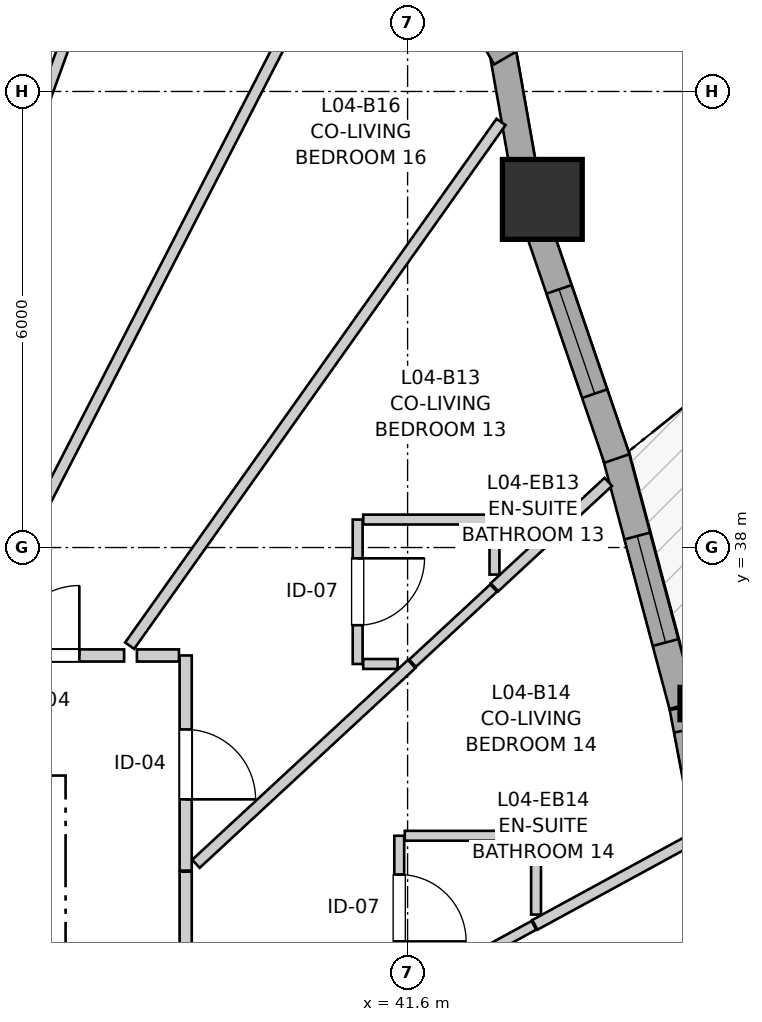
"""IFC4 building model, lengths in metres.
Left out: names, types, materials, properties, quantities, classifications, styles, units other than length and angle.
Written with IfcOpenShell. Run it as: python <this file> out.ifc"""

import sys

from ifc_helpers import new_model, si_unit, direction, frame, frame_2d, origin, origin_2d, place, context, subcontext, project, spatial, rectangle, i_section, extrude, source, transform, mapped, element, fill, save


model = new_model("IFC4")
c1 = context("Model", 3, precision=1e-05, world=origin(), true_north=direction((0.0, 1.0)))
c2 = subcontext(c1, "Body", "Model", "MODEL_VIEW")
j1 = project(units=[si_unit("LENGTHUNIT", "METRE"), si_unit("PLANEANGLEUNIT", "RADIAN")], contexts=[c1])
p1 = place(None, origin())
s1 = spatial("IfcSite", under=j1, at=p1, CompositionType="ELEMENT")
p2 = place(p1, origin())
s2 = spatial("IfcBuilding", under=s1, at=p2, CompositionType="ELEMENT")
p3 = place(p2, frame((0.0, 0.0, 17.4)))
s3 = spatial("IfcBuildingStorey", under=s2, at=p3, CompositionType="ELEMENT", Elevation=17.4)
m1 = source(origin(), c2, "Body", "SweptSolid", [
    extrude(i_section(OverallWidth=0.409, OverallDepth=0.425, WebThickness=0.03, FlangeThickness=0.048, FilletRadius=0.015, at=origin_2d()), origin(), (0.0, 0.0, 1.0), 2.94),
])
p4 = place(p3, frame((45.389, 35.948, 0.0), z_axis=(0.0, 0.0, 1.0), x_axis=(1.0, 0.0, 0.0)))
e1 = element("IfcColumn", 1, at=p4, inside=s3, PredefinedType="PILASTER", context=c2, shape_type="MappedRepresentation", body=[
    mapped(m1, transform((0.0, 0.0, 0.0), x_axis=(1.0, 0.0, 0.0), y_axis=(0.0, 1.0, 0.0), z_axis=(0.0, 0.0, 1.0), scale=1.0)),
])
m2 = source(origin(), c2, "Body", "SweptSolid", [
    extrude(rectangle(XDim=1.05, YDim=1.05, at=origin_2d()), origin(), (0.0, 0.0, 1.0), 2.94),
])
p5 = place(p3, frame((43.373, 42.58, 0.0), z_axis=(0.0, 0.0, 1.0), x_axis=(1.0, 0.0, 0.0)))
e2 = element("IfcColumn", 2, at=p5, inside=s3, PredefinedType="COLUMN", context=c2, shape_type="MappedRepresentation", body=[
    mapped(m2, transform((0.0, 0.0, 0.0), x_axis=(1.0, 0.0, 0.0), y_axis=(0.0, 1.0, 0.0), z_axis=(0.0, 0.0, 1.0), scale=1.0)),
])
p6 = place(p3, frame((45.854, 32.562, 0.0), z_axis=(0.0, 0.0, 1.0), x_axis=(-0.186698837055, 0.982417194598, 0.0)))
e3 = element("IfcWall", 3, at=p6, inside=s3, PredefinedType="SOLIDWALL", context=c2, shape_type="SweptSolid", body=[
    extrude(rectangle(XDim=3.393, YDim=0.35, at=frame_2d((1.697, 0.0))), origin(), (0.0, 0.0, 1.0), 2.42),
])
p7 = place(p6, frame((0.305, 0.0, 0.82)))
e4 = element("IfcOpeningElement", 4, at=p7, cuts=e3, PredefinedType="OPENING", context=c2, shape_type="SweptSolid", body=[
    extrude(rectangle(XDim=1.15, YDim=1.2, at=frame_2d((0.575, 0.6))), frame((0.0, 0.185, 0.0), z_axis=(0.0, -1.0, 0.0), x_axis=(1.0, 0.0, 0.0)), (0.0, 0.0, 1.0), 0.37),
])
p8 = place(p6, frame((1.842, 0.0, 0.82)))
e5 = element("IfcOpeningElement", 5, at=p8, cuts=e3, PredefinedType="OPENING", context=c2, shape_type="SweptSolid", body=[
    extrude(rectangle(XDim=1.25, YDim=1.35, at=frame_2d((0.625, 0.675))), frame((0.0, 0.185, 0.0), z_axis=(0.0, -1.0, 0.0), x_axis=(1.0, 0.0, 0.0)), (0.0, 0.0, 1.0), 0.37),
])
p9 = place(p3, frame((45.214, 35.922, 0.0), z_axis=(0.0, 0.0, 1.0), x_axis=(-0.257081073508, 0.966389839373, 0.0)))
e6 = element("IfcWall", 6, at=p9, inside=s3, PredefinedType="SOLIDWALL", context=c2, shape_type="SweptSolid", body=[
    extrude(rectangle(XDim=3.449, YDim=0.35, at=frame_2d((1.725, 0.0))), origin(), (0.0, 0.0, 1.0), 2.42),
])
p10 = place(p9, frame((0.857, 0.0, 0.82)))
e7 = element("IfcOpeningElement", 7, at=p10, cuts=e6, PredefinedType="OPENING", context=c2, shape_type="SweptSolid", body=[
    extrude(rectangle(XDim=1.45, YDim=1.25, at=frame_2d((0.725, 0.625))), frame((0.0, 0.185, 0.0), z_axis=(0.0, -1.0, 0.0), x_axis=(1.0, 0.0, 0.0)), (0.0, 0.0, 1.0), 0.37),
])
p11 = place(p3, frame((44.353, 39.171, 0.0), z_axis=(0.0, 0.0, 1.0), x_axis=(-0.323604310653, 0.946192501623, 0.0)))
e8 = element("IfcWall", 8, at=p11, inside=s3, PredefinedType="SOLIDWALL", context=c2, shape_type="SweptSolid", body=[
    extrude(rectangle(XDim=3.243, YDim=0.35, at=frame_2d((1.621, 0.0))), origin(), (0.0, 0.0, 1.0), 2.42),
])
p12 = place(p11, frame((0.901, 0.0, 0.82)))
e9 = element("IfcOpeningElement", 9, at=p12, cuts=e8, PredefinedType="OPENING", context=c2, shape_type="SweptSolid", body=[
    extrude(rectangle(XDim=1.45, YDim=1.25, at=frame_2d((0.725, 0.625))), frame((0.0, 0.185, 0.0), z_axis=(0.0, -1.0, 0.0), x_axis=(1.0, 0.0, 0.0)), (0.0, 0.0, 1.0), 0.37),
])
p13 = place(p3, frame((43.148, 42.845, 0.0), z_axis=(0.0, 0.0, 1.0), x_axis=(-0.173745591742, 0.984790571315, 0.0)))
e10 = element("IfcWall", 10, at=p13, inside=s3, PredefinedType="SOLIDWALL", context=c2, shape_type="SweptSolid", body=[
    extrude(rectangle(XDim=1.752, YDim=0.35, at=frame_2d((0.876, 0.0))), origin(), (0.0, 0.0, 1.0), 2.42),
])
p14 = place(p3, frame((42.89, 44.443, 0.0), z_axis=(0.0, 0.0, 1.0), x_axis=(-0.499995423472, 0.866028046028, 0.0)))
e11 = element("IfcWall", 11, at=p14, inside=s3, PredefinedType="SOLIDWALL", context=c2, shape_type="SweptSolid", body=[
    extrude(rectangle(XDim=2.09, YDim=0.35, at=frame_2d((1.045, 0.0))), origin(), (0.0, 0.0, 1.0), 2.42),
])
p15 = place(p14, frame((0.32, 0.0, 0.82)))
e12 = element("IfcOpeningElement", 12, at=p15, cuts=e11, PredefinedType="OPENING", context=c2, shape_type="SweptSolid", body=[
    extrude(rectangle(XDim=1.45, YDim=1.25, at=frame_2d((0.725, 0.625))), frame((0.0, 0.185, 0.0), z_axis=(0.0, -1.0, 0.0), x_axis=(1.0, 0.0, 0.0)), (0.0, 0.0, 1.0), 0.37),
])
p16 = place(p3, frame((38.68, 33.735, 0.0), z_axis=(0.0, 0.0, 1.0), x_axis=(0.0, -1.0, 0.0)))
e13 = element("IfcWall", 13, at=p16, inside=s3, PredefinedType="PARTITIONING", context=c2, shape_type="SweptSolid", body=[
    extrude(rectangle(XDim=3.217, YDim=0.16, at=frame_2d((1.608, 0.0))), origin(), (0.0, 0.0, 1.0), 2.94),
])
p17 = place(p16, frame((1.15, 0.0, 0.0)))
e14 = element("IfcOpeningElement", 14, at=p17, cuts=e13, PredefinedType="OPENING", context=c2, shape_type="SweptSolid", body=[
    extrude(rectangle(XDim=0.92, YDim=2.1, at=frame_2d((0.46, 1.05))), frame((0.0, 0.09, 0.0), z_axis=(0.0, -1.0, 0.0), x_axis=(1.0, 0.0, 0.0)), (0.0, 0.0, 1.0), 0.18),
])
p18 = place(p3, frame((38.68, 36.58, 0.0), z_axis=(0.0, 0.0, 1.0), x_axis=(0.0, -1.0, 0.0)))
e15 = element("IfcWall", 15, at=p18, inside=s3, PredefinedType="PARTITIONING", context=c2, shape_type="SweptSolid", body=[
    extrude(rectangle(XDim=2.83, YDim=0.16, at=frame_2d((1.415, 0.0))), origin(), (0.0, 0.0, 1.0), 2.94),
])
p19 = place(p18, frame((0.973, 0.0, 0.0)))
e16 = element("IfcOpeningElement", 16, at=p19, cuts=e15, PredefinedType="OPENING", context=c2, shape_type="SweptSolid", body=[
    extrude(rectangle(XDim=0.92, YDim=2.1, at=frame_2d((0.46, 1.05))), frame((0.0, 0.09, 0.0), z_axis=(0.0, -1.0, 0.0), x_axis=(1.0, 0.0, 0.0)), (0.0, 0.0, 1.0), 0.18),
])
p20 = place(p3, frame((35.773, 36.58, 0.0), z_axis=(0.0, 0.0, 1.0), x_axis=(1.0, 0.0, 0.0)))
e17 = element("IfcWall", 17, at=p20, inside=s3, PredefinedType="PARTITIONING", context=c2, shape_type="SweptSolid", body=[
    extrude(rectangle(XDim=2.097, YDim=0.16, at=frame_2d((1.049, 0.0))), origin(), (0.0, 0.0, 1.0), 2.94),
])
p21 = place(p20, frame((0.588, 0.0, 0.0)))
e18 = element("IfcOpeningElement", 18, at=p21, cuts=e17, PredefinedType="OPENING", context=c2, shape_type="SweptSolid", body=[
    extrude(rectangle(XDim=0.92, YDim=2.1, at=frame_2d((0.46, 1.05))), frame((0.0, 0.09, 0.0), z_axis=(0.0, -1.0, 0.0), x_axis=(1.0, 0.0, 0.0)), (0.0, 0.0, 1.0), 0.18),
])
p22 = place(p3, frame((40.943, 38.368, 0.0), z_axis=(0.0, 0.0, 1.0), x_axis=(0.0, -1.0, 0.0)))
e19 = element("IfcWall", 19, at=p22, inside=s3, PredefinedType="PARTITIONING", context=c2, shape_type="SweptSolid", body=[
    extrude(rectangle(XDim=1.9, YDim=0.13, at=frame_2d((0.95, 0.0))), origin(), (0.0, 0.0, 1.0), 2.94),
])
p23 = place(p22, frame((0.51, 0.0, 0.0)))
e20 = element("IfcOpeningElement", 20, at=p23, cuts=e19, PredefinedType="OPENING", context=c2, shape_type="SweptSolid", body=[
    extrude(rectangle(XDim=0.88, YDim=2.05, at=frame_2d((0.44, 1.025))), frame((0.0, 0.075, 0.0), z_axis=(0.0, -1.0, 0.0), x_axis=(1.0, 0.0, 0.0)), (0.0, 0.0, 1.0), 0.15),
])
p24 = place(p3, frame((41.49, 34.208, 0.0), z_axis=(0.0, 0.0, 1.0), x_axis=(0.0, -1.0, 0.0)))
e21 = element("IfcWall", 21, at=p24, inside=s3, PredefinedType="PARTITIONING", context=c2, shape_type="SweptSolid", body=[
    extrude(rectangle(XDim=1.9, YDim=0.13, at=frame_2d((0.95, 0.0))), origin(), (0.0, 0.0, 1.0), 2.94),
])
p25 = place(p24, frame((0.51, 0.0, 0.0)))
e22 = element("IfcOpeningElement", 22, at=p25, cuts=e21, PredefinedType="OPENING", context=c2, shape_type="SweptSolid", body=[
    extrude(rectangle(XDim=0.88, YDim=2.05, at=frame_2d((0.44, 1.025))), frame((0.0, 0.075, 0.0), z_axis=(0.0, -1.0, 0.0), x_axis=(1.0, 0.0, 0.0)), (0.0, 0.0, 1.0), 0.15),
])
p26 = place(p3, frame((34.219, 36.692, 0.0), z_axis=(0.0, 0.0, 1.0), x_axis=(0.340186046968, 0.940358151689, 0.0)))
e23 = element("IfcWall", 23, at=p26, inside=s3, PredefinedType="PARTITIONING", context=c2, shape_type="SweptSolid", body=[
    extrude(rectangle(XDim=11.951, YDim=0.145, at=frame_2d((5.976, 0.0))), origin(), (0.0, 0.0, 1.0), 2.94),
])
p27 = place(p3, frame((35.852, 36.7, 0.0), z_axis=(0.0, 0.0, 1.0), x_axis=(0.457258091214, 0.889334041865, 0.0)))
e24 = element("IfcWall", 24, at=p27, inside=s3, PredefinedType="PARTITIONING", context=c2, shape_type="SweptSolid", body=[
    extrude(rectangle(XDim=11.227, YDim=0.145, at=frame_2d((5.613, 0.0))), origin(), (0.0, 0.0, 1.0), 2.94),
])
p28 = place(p3, frame((37.943, 36.708, 0.0), z_axis=(0.0, 0.0, 1.0), x_axis=(0.578429476704, 0.81573239514, 0.0)))
e25 = element("IfcWall", 25, at=p28, inside=s3, PredefinedType="PARTITIONING", context=c2, shape_type="SweptSolid", body=[
    extrude(rectangle(XDim=8.447, YDim=0.145, at=frame_2d((4.223, 0.0))), origin(), (0.0, 0.0, 1.0), 2.94),
])
p29 = place(p3, frame((38.815, 33.839, 0.0), z_axis=(0.0, 0.0, 1.0), x_axis=(0.733718730688, 0.67945332749, 0.0)))
e26 = element("IfcWall", 26, at=p29, inside=s3, PredefinedType="PARTITIONING", context=c2, shape_type="SweptSolid", body=[
    extrude(rectangle(XDim=3.869, YDim=0.145, at=frame_2d((1.935, 0.0))), origin(), (0.0, 0.0, 1.0), 2.94),
])
p30 = place(p3, frame((43.275, 33.036, 0.0), z_axis=(0.0, 0.0, 1.0), x_axis=(0.878237509553, 0.478224713721, 0.0)))
e27 = element("IfcWall", 27, at=p30, inside=s3, PredefinedType="PARTITIONING", context=c2, shape_type="SweptSolid", body=[
    extrude(rectangle(XDim=2.372, YDim=0.145, at=frame_2d((1.186, 0.0))), origin(), (0.0, 0.0, 1.0), 2.94),
])
p31 = place(p3, frame((42.743, 37.477, 0.0), z_axis=(0.0, 0.0, 1.0), x_axis=(0.73374741774, 0.679422347999, 0.0)))
e28 = element("IfcWall", 28, at=p31, inside=s3, PredefinedType="PARTITIONING", context=c2, shape_type="SweptSolid", body=[
    extrude(rectangle(XDim=2.04, YDim=0.145, at=frame_2d((1.02, 0.0))), origin(), (0.0, 0.0, 1.0), 2.94),
])
p32 = place(p3, frame((41.016, 38.368, 0.0), z_axis=(0.0, 0.0, 1.0), x_axis=(1.0, 0.0, 0.0)))
e29 = element("IfcWall", 29, at=p32, inside=s3, PredefinedType="PARTITIONING", context=c2, shape_type="SweptSolid", body=[
    extrude(rectangle(XDim=1.727, YDim=0.13, at=frame_2d((0.863, 0.0))), origin(), (0.0, 0.0, 1.0), 2.94),
])
p33 = place(p3, frame((41.563, 34.208, 0.0), z_axis=(0.0, 0.0, 1.0), x_axis=(1.0, 0.0, 0.0)))
e30 = element("IfcWall", 30, at=p33, inside=s3, PredefinedType="PARTITIONING", context=c2, shape_type="SweptSolid", body=[
    extrude(rectangle(XDim=1.727, YDim=0.13, at=frame_2d((0.864, 0.0))), origin(), (0.0, 0.0, 1.0), 2.94),
])
p34 = place(p3, frame((41.978, 32.33, 0.0), z_axis=(0.0, 0.0, 1.0), x_axis=(0.878138043068, 0.478407334097, 0.0)))
e31 = element("IfcWall", 31, at=p34, inside=s3, PredefinedType="PARTITIONING", context=c2, shape_type="SweptSolid", body=[
    extrude(rectangle(XDim=1.462, YDim=0.13, at=frame_2d((0.731, 0.0))), origin(), (0.0, 0.0, 1.0), 2.94),
])
p35 = place(p3, frame((41.665, 36.478, 0.0), z_axis=(0.0, 0.0, 1.0), x_axis=(0.733534386117, 0.679652340821, 0.0)))
e32 = element("IfcWall", 32, at=p35, inside=s3, PredefinedType="PARTITIONING", context=c2, shape_type="SweptSolid", body=[
    extrude(rectangle(XDim=1.454, YDim=0.13, at=frame_2d((0.727, 0.0))), origin(), (0.0, 0.0, 1.0), 2.94),
])
p36 = place(p3, frame((43.29, 33.171, 0.0), z_axis=(0.0, 0.0, 1.0), x_axis=(0.0, 1.0, 0.0)))
e33 = element("IfcWall", 33, at=p36, inside=s3, PredefinedType="PARTITIONING", context=c2, shape_type="SweptSolid", body=[
    extrude(rectangle(XDim=0.964, YDim=0.13, at=frame_2d((0.482, 0.0))), origin(), (0.0, 0.0, 1.0), 2.94),
])
p37 = place(p3, frame((42.743, 37.644, 0.0), z_axis=(0.0, 0.0, 1.0), x_axis=(0.0, 1.0, 0.0)))
e34 = element("IfcWall", 34, at=p37, inside=s3, PredefinedType="PARTITIONING", context=c2, shape_type="SweptSolid", body=[
    extrude(rectangle(XDim=0.651, YDim=0.13, at=frame_2d((0.325, 0.0))), origin(), (0.0, 0.0, 1.0), 2.94),
])
p38 = place(p3, frame((38.039, 36.58, 0.0), z_axis=(0.0, 0.0, 1.0), x_axis=(1.0, 0.0, 0.0)))
e35 = element("IfcWall", 35, at=p38, inside=s3, PredefinedType="PARTITIONING", context=c2, shape_type="SweptSolid", body=[
    extrude(rectangle(XDim=0.553, YDim=0.16, at=frame_2d((0.277, 0.0))), origin(), (0.0, 0.0, 1.0), 2.94),
])
p39 = place(p3, frame((41.016, 36.468, 0.0), z_axis=(0.0, 0.0, 1.0), x_axis=(1.0, 0.0, 0.0)))
e36 = element("IfcWall", 36, at=p39, inside=s3, PredefinedType="PARTITIONING", context=c2, shape_type="SweptSolid", body=[
    extrude(rectangle(XDim=0.453, YDim=0.13, at=frame_2d((0.227, 0.0))), origin(), (0.0, 0.0, 1.0), 2.94),
])
m3 = source(origin(), c2, "Body", "SweptSolid", [
    extrude(rectangle(XDim=1.45, YDim=1.25, at=frame_2d((0.725, 0.625))), frame((0.0, 0.03, 0.0), z_axis=(0.0, -1.0, 0.0), x_axis=(1.0, 0.0, 0.0)), (0.0, 0.0, 1.0), 0.06),
])
p40 = place(p10, origin())
e37 = element("IfcWindow", 37, at=p40, inside=s3, PartitioningType="SINGLE_PANEL", PredefinedType="WINDOW", context=c2, shape_type="MappedRepresentation", body=[
    mapped(m3, transform((0.0, 0.0, 0.0), x_axis=(1.0, 0.0, 0.0), y_axis=(0.0, 1.0, 0.0), z_axis=(0.0, 0.0, 1.0), scale=1.0)),
])
fill(e7, e37)
p41 = place(p12, origin())
e38 = element("IfcWindow", 38, at=p41, inside=s3, PartitioningType="SINGLE_PANEL", PredefinedType="WINDOW", context=c2, shape_type="MappedRepresentation", body=[
    mapped(m3, transform((0.0, 0.0, 0.0), x_axis=(1.0, 0.0, 0.0), y_axis=(0.0, 1.0, 0.0), z_axis=(0.0, 0.0, 1.0), scale=1.0)),
])
fill(e9, e38)
m4 = source(origin(), c2, "Body", "SweptSolid", [
    extrude(rectangle(XDim=0.92, YDim=2.1, at=frame_2d((0.46, 1.05))), frame((0.0, 0.025, 0.0), z_axis=(0.0, -1.0, 0.0), x_axis=(1.0, 0.0, 0.0)), (0.0, 0.0, 1.0), 0.05),
])
p42 = place(p19, origin())
e39 = element("IfcDoor", 39, at=p42, inside=s3, OperationType="SINGLE_SWING_RIGHT", PredefinedType="DOOR", context=c2, shape_type="MappedRepresentation", body=[
    mapped(m4, transform((0.0, 0.0, 0.0), x_axis=(1.0, 0.0, 0.0), y_axis=(0.0, 1.0, 0.0), z_axis=(0.0, 0.0, 1.0), scale=1.0)),
])
fill(e16, e39)
p43 = place(p21, origin())
e40 = element("IfcDoor", 40, at=p43, inside=s3, OperationType="SINGLE_SWING_RIGHT", PredefinedType="DOOR", context=c2, shape_type="MappedRepresentation", body=[
    mapped(m4, transform((0.0, 0.0, 0.0), x_axis=(1.0, 0.0, 0.0), y_axis=(0.0, 1.0, 0.0), z_axis=(0.0, 0.0, 1.0), scale=1.0)),
])
fill(e18, e40)
m5 = source(origin(), c2, "Body", "SweptSolid", [
    extrude(rectangle(XDim=0.88, YDim=2.05, at=frame_2d((0.44, 1.025))), frame((0.0, 0.025, 0.0), z_axis=(0.0, -1.0, 0.0), x_axis=(1.0, 0.0, 0.0)), (0.0, 0.0, 1.0), 0.05),
])
p44 = place(p23, origin())
e41 = element("IfcDoor", 41, at=p44, inside=s3, OperationType="SINGLE_SWING_LEFT", PredefinedType="DOOR", context=c2, shape_type="MappedRepresentation", body=[
    mapped(m5, transform((0.0, 0.0, 0.0), x_axis=(1.0, 0.0, 0.0), y_axis=(0.0, 1.0, 0.0), z_axis=(0.0, 0.0, 1.0), scale=1.0)),
])
fill(e20, e41)
p45 = place(p25, origin())
e42 = element("IfcDoor", 42, at=p45, inside=s3, OperationType="SINGLE_SWING_RIGHT", PredefinedType="DOOR", context=c2, shape_type="MappedRepresentation", body=[
    mapped(m5, transform((0.0, 0.0, 0.0), x_axis=(1.0, 0.0, 0.0), y_axis=(0.0, 1.0, 0.0), z_axis=(0.0, 0.0, 1.0), scale=1.0)),
])
fill(e22, e42)
save(model, sys.argv[1])
